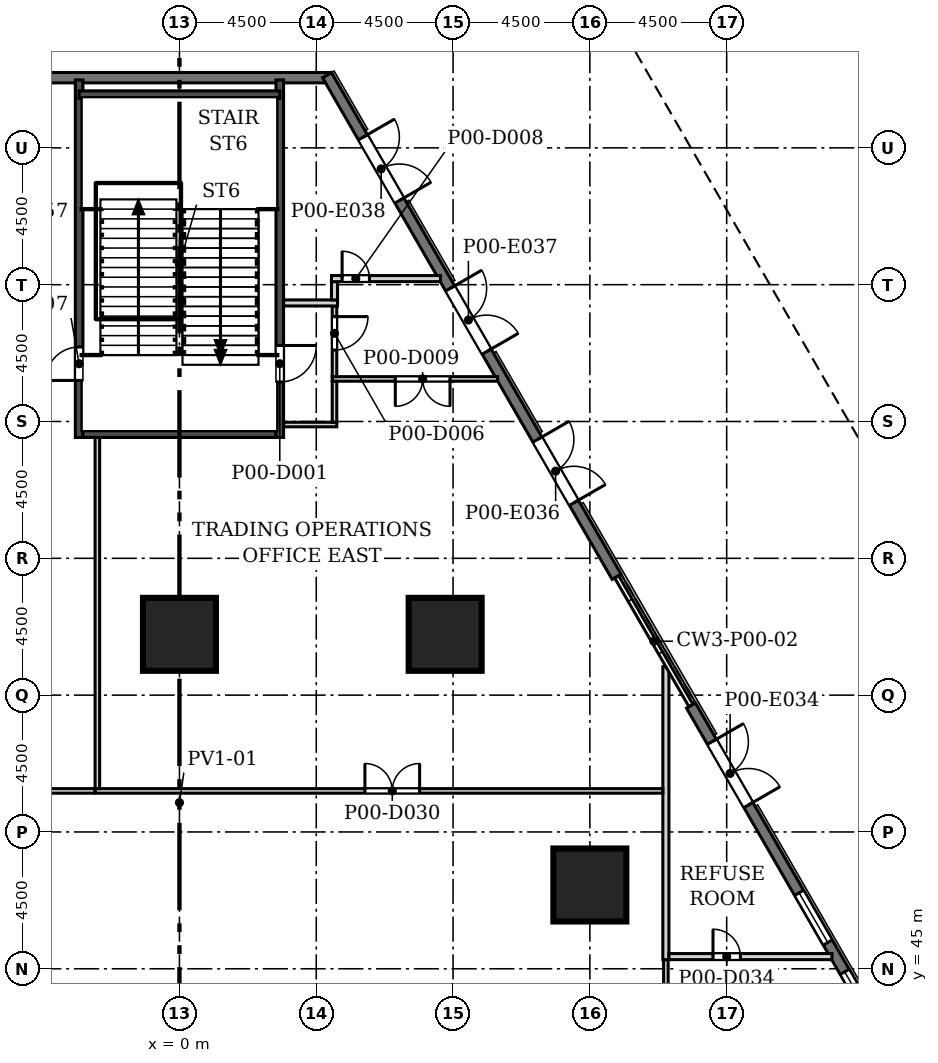
"""IFC4 building model, lengths in metres.
Left out: names, types, materials, properties, quantities, classifications, styles, units other than length and angle.
Written with IfcOpenShell. Run it as: python <this file> out.ifc"""

import sys

from ifc_helpers import new_model, si_unit, direction, frame, frame_2d, origin, origin_2d, place, context, subcontext, project, spatial, polyline, rectangle, outline, extrude, element, fill, save


model = new_model("IFC4")
c1 = context("Model", 3, precision=1e-05, world=origin(), true_north=direction((0.0, 1.0)))
c2 = subcontext(c1, "Body", "Model", "MODEL_VIEW")
j1 = project(units=[si_unit("LENGTHUNIT", "METRE"), si_unit("PLANEANGLEUNIT", "RADIAN")], contexts=[c1])
p1 = place(None, origin())
s1 = spatial("IfcSite", under=j1, at=p1, CompositionType="ELEMENT")
p2 = place(p1, origin())
s2 = spatial("IfcBuilding", under=s1, at=p2, CompositionType="ELEMENT")
p3 = place(p2, origin())
s3 = spatial("IfcBuildingStorey", under=s2, at=p3, CompositionType="ELEMENT", Elevation=0.0)
for number, where, z_axis, x_axis in (
    (1, (8.74, 56.0, 0.0), (0.0, 0.0, 1.0), (1.0, 0.0, 0.0)),
    (2, (0.0, 56.0, 0.0), (0.0, 0.0, 1.0), (1.0, 0.0, 0.0)),
    (3, (13.5, 47.756, 0.0), (0.0, 0.0, 1.0), (1.0, 0.0, 0.0)),
):
    element("IfcColumn", number, at=place(p3, frame(where, z_axis=z_axis, x_axis=x_axis)), inside=s3, PredefinedType="COLUMN", context=c2, shape_type="SweptSolid", body=[
        extrude(rectangle(XDim=2.4, YDim=2.4, at=origin_2d()), origin(), (0.0, 0.0, 1.0), 8.0),
    ])
p4 = place(p3, frame((33.882, 24.114, 0.0), z_axis=(0.0, 0.0, 1.0), x_axis=(-0.500002868947, 0.866023747391, 0.0)))
e4 = element("IfcWall", 4, at=p4, inside=s3, PredefinedType="SOLIDWALL", context=c2, shape_type="SweptSolid", body=[
    extrude(rectangle(XDim=34.115, YDim=0.34, at=frame_2d((17.058, 0.0))), origin(), (0.0, 0.0, 1.0), 7.7),
])
p5 = place(p4, frame((1.115, 0.0, 0.9)))
e5 = element("IfcOpeningElement", 5, at=p5, cuts=e4, PredefinedType="OPENING", context=c2, shape_type="SweptSolid", body=[
    extrude(rectangle(XDim=1.885, YDim=3.5, at=frame_2d((0.942, 1.75))), frame((0.0, 0.18, 0.0), z_axis=(0.0, -1.0, 0.0), x_axis=(1.0, 0.0, 0.0)), (0.0, 0.0, 1.0), 0.36),
])
p6 = place(p4, frame((4.115, 0.0, 0.9)))
e6 = element("IfcOpeningElement", 6, at=p6, cuts=e4, PredefinedType="OPENING", context=c2, shape_type="SweptSolid", body=[
    extrude(rectangle(XDim=1.885, YDim=3.5, at=frame_2d((0.942, 1.75))), frame((0.0, 0.18, 0.0), z_axis=(0.0, -1.0, 0.0), x_axis=(1.0, 0.0, 0.0)), (0.0, 0.0, 1.0), 0.36),
])
p7 = place(p4, frame((22.115, 0.0, 0.9)))
e7 = element("IfcOpeningElement", 7, at=p7, cuts=e4, PredefinedType="OPENING", context=c2, shape_type="SweptSolid", body=[
    extrude(rectangle(XDim=1.885, YDim=3.5, at=frame_2d((0.942, 1.75))), frame((0.0, 0.18, 0.0), z_axis=(0.0, -1.0, 0.0), x_axis=(1.0, 0.0, 0.0)), (0.0, 0.0, 1.0), 0.36),
])
p8 = place(p4, frame((25.115, 0.0, 0.9)))
e8 = element("IfcOpeningElement", 8, at=p8, cuts=e4, PredefinedType="OPENING", context=c2, shape_type="SweptSolid", body=[
    extrude(rectangle(XDim=1.885, YDim=3.5, at=frame_2d((0.942, 1.75))), frame((0.0, 0.18, 0.0), z_axis=(0.0, -1.0, 0.0), x_axis=(1.0, 0.0, 0.0)), (0.0, 0.0, 1.0), 0.36),
])
p9 = place(p4, frame((7.378, 0.0, 0.0)))
e9 = element("IfcOpeningElement", 9, at=p9, cuts=e4, PredefinedType="OPENING", context=c2, shape_type="SweptSolid", body=[
    extrude(rectangle(XDim=2.4, YDim=2.7, at=frame_2d((1.2, 1.35))), frame((0.0, 0.18, 0.0), z_axis=(0.0, -1.0, 0.0), x_axis=(1.0, 0.0, 0.0)), (0.0, 0.0, 1.0), 0.36),
])
p10 = place(p4, frame((18.857, 0.0, 0.0)))
e10 = element("IfcOpeningElement", 10, at=p10, cuts=e4, PredefinedType="OPENING", context=c2, shape_type="SweptSolid", body=[
    extrude(rectangle(XDim=2.4, YDim=2.7, at=frame_2d((1.2, 1.35))), frame((0.0, 0.18, 0.0), z_axis=(0.0, -1.0, 0.0), x_axis=(1.0, 0.0, 0.0)), (0.0, 0.0, 1.0), 0.36),
])
p11 = place(p4, frame((30.336, 0.0, 0.0)))
e11 = element("IfcOpeningElement", 11, at=p11, cuts=e4, PredefinedType="OPENING", context=c2, shape_type="SweptSolid", body=[
    extrude(rectangle(XDim=2.4, YDim=2.7, at=frame_2d((1.2, 1.35))), frame((0.0, 0.18, 0.0), z_axis=(0.0, -1.0, 0.0), x_axis=(1.0, 0.0, 0.0)), (0.0, 0.0, 1.0), 0.36),
])
p12 = place(p4, frame((12.215, 0.0, 0.0)))
e12 = element("IfcOpeningElement", 12, at=p12, cuts=e4, PredefinedType="OPENING", context=c2, shape_type="SweptSolid", body=[
    extrude(rectangle(XDim=4.885, YDim=4.5, at=frame_2d((2.442, 2.25))), frame((0.0, 0.18, 0.0), z_axis=(0.0, -1.0, 0.0), x_axis=(1.0, 0.0, 0.0)), (0.0, 0.0, 1.0), 0.36),
])
p13 = place(p3, frame((14.382, 57.889, 0.0), z_axis=(0.0, 0.0, 1.0), x_axis=(-0.499999683919, 0.866025586274, 0.0)))
e13 = element("IfcWall", 13, at=p13, inside=s3, PredefinedType="SOLIDWALL", context=c2, shape_type="SweptSolid", body=[
    extrude(rectangle(XDim=19.058, YDim=0.34, at=frame_2d((9.529, 0.0))), origin(), (0.0, 0.0, 1.0), 7.7),
])
p14 = place(p13, frame((2.815, 0.0, 0.0)))
e14 = element("IfcOpeningElement", 14, at=p14, cuts=e13, PredefinedType="OPENING", context=c2, shape_type="SweptSolid", body=[
    extrude(rectangle(XDim=2.4, YDim=2.7, at=frame_2d((1.2, 1.35))), frame((0.0, 0.18, 0.0), z_axis=(0.0, -1.0, 0.0), x_axis=(1.0, 0.0, 0.0)), (0.0, 0.0, 1.0), 0.36),
])
p15 = place(p13, frame((8.555, 0.0, 0.0)))
e15 = element("IfcOpeningElement", 15, at=p15, cuts=e13, PredefinedType="OPENING", context=c2, shape_type="SweptSolid", body=[
    extrude(rectangle(XDim=2.4, YDim=2.7, at=frame_2d((1.2, 1.35))), frame((0.0, 0.18, 0.0), z_axis=(0.0, -1.0, 0.0), x_axis=(1.0, 0.0, 0.0)), (0.0, 0.0, 1.0), 0.36),
])
p16 = place(p13, frame((14.294, 0.0, 0.0)))
e16 = element("IfcOpeningElement", 16, at=p16, cuts=e13, PredefinedType="OPENING", context=c2, shape_type="SweptSolid", body=[
    extrude(rectangle(XDim=2.4, YDim=2.7, at=frame_2d((1.2, 1.35))), frame((0.0, 0.18, 0.0), z_axis=(0.0, -1.0, 0.0), x_axis=(1.0, 0.0, 0.0)), (0.0, 0.0, 1.0), 0.36),
])
p17 = place(p3, origin())
e17 = element("IfcWall", 17, at=p17, inside=s3, PredefinedType="SOLIDWALL", context=c2, shape_type="SweptSolid", body=[
    extrude(outline(polyline([(5.001, 74.478), (4.706, 74.308), (4.805, 74.138), (-4.805, 74.138), (-4.706, 74.308), (-5.001, 74.478), (-5.001, 74.479), (5.001, 74.479), (5.001, 74.478)])), origin(), (0.0, 0.0, 1.0), 7.7),
])
p18 = place(p3, frame((16.0, 38.575, 0.0), z_axis=(0.0, 0.0, 1.0), x_axis=(0.0, 1.0, 0.0)))
e18 = element("IfcWall", 18, at=p18, inside=s3, PredefinedType="PARTITIONING", context=c2, shape_type="SweptSolid", body=[
    extrude(rectangle(XDim=6.725, YDim=0.15, at=frame_2d((3.363, 0.0))), origin(), (0.0, 0.0, 1.0), 7.7),
])
p19 = place(p3, frame((16.0, 45.3, 0.0), z_axis=(0.0, 0.0, 1.0), x_axis=(0.0, 1.0, 0.0)))
e19 = element("IfcWall", 19, at=p19, inside=s3, PredefinedType="PARTITIONING", context=c2, shape_type="SweptSolid", body=[
    extrude(rectangle(XDim=9.635, YDim=0.2, at=frame_2d((4.818, 0.0))), origin(), (0.0, 0.0, 1.0), 7.7),
])
p20 = place(p3, frame((21.461, 45.4, 0.0), z_axis=(0.0, 0.0, 1.0), x_axis=(-1.0, 0.0, 0.0)))
e20 = element("IfcWall", 20, at=p20, inside=s3, PredefinedType="PARTITIONING", context=c2, shape_type="SweptSolid", body=[
    extrude(rectangle(XDim=5.361, YDim=0.2, at=frame_2d((2.681, 0.0))), origin(), (0.0, 0.0, 1.0), 7.7),
])
p21 = place(p20, frame((3.011, 0.0, 0.0)))
e21 = element("IfcOpeningElement", 21, at=p21, cuts=e20, PredefinedType="OPENING", context=c2, shape_type="SweptSolid", body=[
    extrude(rectangle(XDim=0.9, YDim=2.1, at=frame_2d((0.45, 1.05))), frame((0.0, 0.11, 0.0), z_axis=(0.0, -1.0, 0.0), x_axis=(1.0, 0.0, 0.0)), (0.0, 0.0, 1.0), 0.22),
])
p22 = place(p3, frame((-16.075, 50.85, 0.0), z_axis=(0.0, 0.0, 1.0), x_axis=(1.0, 0.0, 0.0)))
e22 = element("IfcWall", 22, at=p22, inside=s3, PredefinedType="PARTITIONING", context=c2, shape_type="SweptSolid", body=[
    extrude(rectangle(XDim=13.3, YDim=0.15, at=frame_2d((6.65, 0.0))), origin(), (0.0, 0.0, 1.0), 7.7),
])
p23 = place(p22, frame((7.175, 0.0, 0.0)))
e23 = element("IfcOpeningElement", 23, at=p23, cuts=e22, PredefinedType="OPENING", context=c2, shape_type="SweptSolid", body=[
    extrude(rectangle(XDim=1.8, YDim=2.1, at=frame_2d((0.9, 1.05))), frame((0.0, 0.085, 0.0), z_axis=(0.0, -1.0, 0.0), x_axis=(1.0, 0.0, 0.0)), (0.0, 0.0, 1.0), 0.17),
])
p24 = place(p3, frame((-2.775, 50.85, 0.0), z_axis=(0.0, 0.0, 1.0), x_axis=(1.0, 0.0, 0.0)))
e24 = element("IfcWall", 24, at=p24, inside=s3, PredefinedType="PARTITIONING", context=c2, shape_type="SweptSolid", body=[
    extrude(rectangle(XDim=18.675, YDim=0.15, at=frame_2d((9.337, 0.0))), origin(), (0.0, 0.0, 1.0), 7.7),
])
p25 = place(p24, frame((8.875, 0.0, 0.0)))
e25 = element("IfcOpeningElement", 25, at=p25, cuts=e24, PredefinedType="OPENING", context=c2, shape_type="SweptSolid", body=[
    extrude(rectangle(XDim=1.8, YDim=2.1, at=frame_2d((0.9, 1.05))), frame((0.0, 0.085, 0.0), z_axis=(0.0, -1.0, 0.0), x_axis=(1.0, 0.0, 0.0)), (0.0, 0.0, 1.0), 0.17),
])
p26 = place(p3, frame((-3.3, 62.475, 0.0), z_axis=(0.0, 0.0, 1.0), x_axis=(0.0, 1.0, 0.0)))
e26 = element("IfcWall", 26, at=p26, inside=s3, PredefinedType="SOLIDWALL", context=c2, shape_type="SweptSolid", body=[
    extrude(rectangle(XDim=11.758, YDim=0.25, at=frame_2d((5.879, 0.0))), origin(), (0.0, 0.0, 1.0), 7.7),
])
p27 = place(p26, frame((1.875, 0.0, 0.0)))
e27 = element("IfcOpeningElement", 27, at=p27, cuts=e26, PredefinedType="OPENING", context=c2, shape_type="SweptSolid", body=[
    extrude(rectangle(XDim=1.1, YDim=2.1, at=frame_2d((0.55, 1.05))), frame((0.0, 0.135, 0.0), z_axis=(0.0, -1.0, 0.0), x_axis=(1.0, 0.0, 0.0)), (0.0, 0.0, 1.0), 0.27),
])
p28 = place(p3, frame((-2.7, 62.475, 0.0), z_axis=(0.0, 0.0, 1.0), x_axis=(0.0, -1.0, 0.0)))
e28 = element("IfcWall", 28, at=p28, inside=s3, PredefinedType="PARTITIONING", context=c2, shape_type="SweptSolid", body=[
    extrude(rectangle(XDim=11.55, YDim=0.15, at=frame_2d((5.775, 0.0))), origin(), (0.0, 0.0, 1.0), 7.7),
])
p29 = place(p3, frame((3.175, 62.6, 0.0), z_axis=(0.0, 0.0, 1.0), x_axis=(-1.0, 0.0, 0.0)))
e29 = element("IfcWall", 29, at=p29, inside=s3, PredefinedType="SOLIDWALL", context=c2, shape_type="SweptSolid", body=[
    extrude(rectangle(XDim=6.35, YDim=0.25, at=frame_2d((3.175, 0.0))), origin(), (0.0, 0.0, 1.0), 7.7),
])
p30 = place(p3, frame((5.175, 62.9, 0.0), z_axis=(0.0, 0.0, 1.0), x_axis=(-1.0, 0.0, 0.0)))
e30 = element("IfcWall", 30, at=p30, inside=s3, PredefinedType="PARTITIONING", context=c2, shape_type="SweptSolid", body=[
    extrude(rectangle(XDim=1.75, YDim=0.15, at=frame_2d((0.875, 0.0))), origin(), (0.0, 0.0, 1.0), 7.7),
])
p31 = place(p3, frame((5.1, 64.325, 0.0), z_axis=(0.0, 0.0, 1.0), x_axis=(0.0, -1.0, 0.0)))
e31 = element("IfcWall", 31, at=p31, inside=s3, PredefinedType="PARTITIONING", context=c2, shape_type="SweptSolid", body=[
    extrude(rectangle(XDim=1.35, YDim=0.15, at=frame_2d((0.675, 0.0))), origin(), (0.0, 0.0, 1.0), 7.7),
])
p32 = place(p3, frame((10.466, 64.4, 0.0), z_axis=(0.0, 0.0, 1.0), x_axis=(-1.0, 0.0, 0.0)))
e32 = element("IfcWall", 32, at=p32, inside=s3, PredefinedType="PARTITIONING", context=c2, shape_type="SweptSolid", body=[
    extrude(rectangle(XDim=5.441, YDim=0.15, at=frame_2d((2.721, 0.0))), origin(), (0.0, 0.0, 1.0), 7.7),
])
p33 = place(p32, frame((1.566, 0.0, 0.0)))
e33 = element("IfcOpeningElement", 33, at=p33, cuts=e32, PredefinedType="OPENING", context=c2, shape_type="SweptSolid", body=[
    extrude(rectangle(XDim=1.8, YDim=2.1, at=frame_2d((0.9, 1.05))), frame((0.0, 0.085, 0.0), z_axis=(0.0, -1.0, 0.0), x_axis=(1.0, 0.0, 0.0)), (0.0, 0.0, 1.0), 0.17),
])
p34 = place(p3, frame((5.1, 66.8, 0.0), z_axis=(0.0, 0.0, 1.0), x_axis=(0.0, -1.0, 0.0)))
e34 = element("IfcWall", 34, at=p34, inside=s3, PredefinedType="PARTITIONING", context=c2, shape_type="SweptSolid", body=[
    extrude(rectangle(XDim=2.325, YDim=0.15, at=frame_2d((1.163, 0.0))), origin(), (0.0, 0.0, 1.0), 7.7),
])
p35 = place(p34, frame((0.35, 0.0, 0.0)))
e35 = element("IfcOpeningElement", 35, at=p35, cuts=e34, PredefinedType="OPENING", context=c2, shape_type="SweptSolid", body=[
    extrude(rectangle(XDim=1.1, YDim=2.1, at=frame_2d((0.55, 1.05))), frame((0.0, 0.085, 0.0), z_axis=(0.0, -1.0, 0.0), x_axis=(1.0, 0.0, 0.0)), (0.0, 0.0, 1.0), 0.17),
])
p36 = place(p3, frame((3.425, 66.9, 0.0), z_axis=(0.0, 0.0, 1.0), x_axis=(1.0, 0.0, 0.0)))
e36 = element("IfcWall", 36, at=p36, inside=s3, PredefinedType="PARTITIONING", context=c2, shape_type="SweptSolid", body=[
    extrude(rectangle(XDim=1.775, YDim=0.2, at=frame_2d((0.887, 0.0))), origin(), (0.0, 0.0, 1.0), 7.7),
])
p37 = place(p3, frame((5.1, 67.0, 0.0), z_axis=(0.0, 0.0, 1.0), x_axis=(0.0, 1.0, 0.0)))
e37 = element("IfcWall", 37, at=p37, inside=s3, PredefinedType="PARTITIONING", context=c2, shape_type="SweptSolid", body=[
    extrude(rectangle(XDim=0.6, YDim=0.2, at=frame_2d((0.3, 0.0))), origin(), (0.0, 0.0, 1.0), 7.7),
])
p38 = place(p3, frame((5.0, 67.7, 0.0), z_axis=(0.0, 0.0, 1.0), x_axis=(1.0, 0.0, 0.0)))
e38 = element("IfcWall", 38, at=p38, inside=s3, PredefinedType="PARTITIONING", context=c2, shape_type="SweptSolid", body=[
    extrude(rectangle(XDim=3.586, YDim=0.2, at=frame_2d((1.793, 0.0))), origin(), (0.0, 0.0, 1.0), 7.7),
])
p39 = place(p38, frame((0.35, 0.0, 0.0)))
e39 = element("IfcOpeningElement", 39, at=p39, cuts=e38, PredefinedType="OPENING", context=c2, shape_type="SweptSolid", body=[
    extrude(rectangle(XDim=0.9, YDim=2.1, at=frame_2d((0.45, 1.05))), frame((0.0, 0.11, 0.0), z_axis=(0.0, -1.0, 0.0), x_axis=(1.0, 0.0, 0.0)), (0.0, 0.0, 1.0), 0.22),
])
p40 = place(p3, frame((3.3, 74.233, 0.0), z_axis=(0.0, 0.0, 1.0), x_axis=(0.0, -1.0, 0.0)))
e40 = element("IfcWall", 40, at=p40, inside=s3, PredefinedType="SOLIDWALL", context=c2, shape_type="SweptSolid", body=[
    extrude(rectangle(XDim=11.758, YDim=0.25, at=frame_2d((5.879, 0.0))), origin(), (0.0, 0.0, 1.0), 7.7),
])
p41 = place(p40, frame((8.733, 0.0, 0.0)))
e41 = element("IfcOpeningElement", 41, at=p41, cuts=e40, PredefinedType="OPENING", context=c2, shape_type="SweptSolid", body=[
    extrude(rectangle(XDim=1.2, YDim=2.1, at=frame_2d((0.6, 1.05))), frame((0.0, 0.135, 0.0), z_axis=(0.0, -1.0, 0.0), x_axis=(1.0, 0.0, 0.0)), (0.0, 0.0, 1.0), 0.27),
])
p42 = place(p3, frame((-3.3, 73.75, 0.0), z_axis=(0.0, 0.0, 1.0), x_axis=(1.0, 0.0, 0.0)))
e42 = element("IfcWall", 42, at=p42, inside=s3, PredefinedType="SOLIDWALL", context=c2, shape_type="SweptSolid", body=[
    extrude(rectangle(XDim=6.6, YDim=0.25, at=frame_2d((3.3, 0.0))), origin(), (0.0, 0.0, 1.0), 7.7),
])
p43 = place(p7, origin())
e43 = element("IfcWindow", 43, at=p43, inside=s3, PartitioningType="SINGLE_PANEL", PredefinedType="WINDOW", context=c2, shape_type="SweptSolid", body=[
    extrude(rectangle(XDim=1.885, YDim=3.5, at=frame_2d((0.942, 1.75))), frame((0.0, 0.11, 0.0), z_axis=(0.0, -1.0, 0.0), x_axis=(1.0, 0.0, 0.0)), (0.0, 0.0, 1.0), 0.06),
])
fill(e7, e43)
p44 = place(p8, origin())
e44 = element("IfcWindow", 44, at=p44, inside=s3, PartitioningType="SINGLE_PANEL", PredefinedType="WINDOW", context=c2, shape_type="SweptSolid", body=[
    extrude(rectangle(XDim=1.885, YDim=3.5, at=frame_2d((0.942, 1.75))), frame((0.0, 0.11, 0.0), z_axis=(0.0, -1.0, 0.0), x_axis=(1.0, 0.0, 0.0)), (0.0, 0.0, 1.0), 0.06),
])
fill(e8, e44)
p45 = place(p11, frame((2.4, 0.0, 0.0), z_axis=(0.0, 0.0, 1.0), x_axis=(-1.0, 0.0, 0.0)))
e45 = element("IfcDoor", 45, at=p45, inside=s3, OperationType="DOUBLE_DOOR_SINGLE_SWING", PredefinedType="DOOR", context=c2, shape_type="SweptSolid", body=[
    extrude(rectangle(XDim=2.4, YDim=2.7, at=frame_2d((1.2, 1.35))), frame((0.0, 0.025, 0.0), z_axis=(0.0, -1.0, 0.0), x_axis=(1.0, 0.0, 0.0)), (0.0, 0.0, 1.0), 0.05),
])
fill(e11, e45)
p46 = place(p14, frame((2.4, 0.0, 0.0), z_axis=(0.0, 0.0, 1.0), x_axis=(-1.0, 0.0, 0.0)))
e46 = element("IfcDoor", 46, at=p46, inside=s3, OperationType="DOUBLE_DOOR_SINGLE_SWING", PredefinedType="DOOR", context=c2, shape_type="SweptSolid", body=[
    extrude(rectangle(XDim=2.4, YDim=2.7, at=frame_2d((1.2, 1.35))), frame((0.0, 0.025, 0.0), z_axis=(0.0, -1.0, 0.0), x_axis=(1.0, 0.0, 0.0)), (0.0, 0.0, 1.0), 0.05),
])
fill(e14, e46)
p47 = place(p15, frame((2.4, 0.0, 0.0), z_axis=(0.0, 0.0, 1.0), x_axis=(-1.0, 0.0, 0.0)))
e47 = element("IfcDoor", 47, at=p47, inside=s3, OperationType="DOUBLE_DOOR_SINGLE_SWING", PredefinedType="DOOR", context=c2, shape_type="SweptSolid", body=[
    extrude(rectangle(XDim=2.4, YDim=2.7, at=frame_2d((1.2, 1.35))), frame((0.0, 0.025, 0.0), z_axis=(0.0, -1.0, 0.0), x_axis=(1.0, 0.0, 0.0)), (0.0, 0.0, 1.0), 0.05),
])
fill(e15, e47)
p48 = place(p16, frame((2.4, 0.0, 0.0), z_axis=(0.0, 0.0, 1.0), x_axis=(-1.0, 0.0, 0.0)))
e48 = element("IfcDoor", 48, at=p48, inside=s3, OperationType="DOUBLE_DOOR_SINGLE_SWING", PredefinedType="DOOR", context=c2, shape_type="SweptSolid", body=[
    extrude(rectangle(XDim=2.4, YDim=2.7, at=frame_2d((1.2, 1.35))), frame((0.0, 0.025, 0.0), z_axis=(0.0, -1.0, 0.0), x_axis=(1.0, 0.0, 0.0)), (0.0, 0.0, 1.0), 0.05),
])
fill(e16, e48)
p49 = place(p41, origin())
e49 = element("IfcDoor", 49, at=p49, inside=s3, OperationType="SINGLE_SWING_LEFT", PredefinedType="DOOR", context=c2, shape_type="SweptSolid", body=[
    extrude(rectangle(XDim=1.2, YDim=2.1, at=frame_2d((0.6, 1.05))), frame((0.0, 0.025, 0.0), z_axis=(0.0, -1.0, 0.0), x_axis=(1.0, 0.0, 0.0)), (0.0, 0.0, 1.0), 0.05),
])
fill(e41, e49)
p50 = place(p35, origin())
e50 = element("IfcDoor", 50, at=p50, inside=s3, OperationType="SINGLE_SWING_LEFT", PredefinedType="DOOR", context=c2, shape_type="SweptSolid", body=[
    extrude(rectangle(XDim=1.1, YDim=2.1, at=frame_2d((0.55, 1.05))), frame((0.0, 0.025, 0.0), z_axis=(0.0, -1.0, 0.0), x_axis=(1.0, 0.0, 0.0)), (0.0, 0.0, 1.0), 0.05),
])
fill(e35, e50)
p51 = place(p27, origin())
e51 = element("IfcDoor", 51, at=p51, inside=s3, OperationType="SINGLE_SWING_LEFT", PredefinedType="DOOR", context=c2, shape_type="SweptSolid", body=[
    extrude(rectangle(XDim=1.1, YDim=2.1, at=frame_2d((0.55, 1.05))), frame((0.0, 0.025, 0.0), z_axis=(0.0, -1.0, 0.0), x_axis=(1.0, 0.0, 0.0)), (0.0, 0.0, 1.0), 0.05),
])
fill(e27, e51)
p52 = place(p39, origin())
e52 = element("IfcDoor", 52, at=p52, inside=s3, OperationType="SINGLE_SWING_LEFT", PredefinedType="DOOR", context=c2, shape_type="SweptSolid", body=[
    extrude(rectangle(XDim=0.9, YDim=2.1, at=frame_2d((0.45, 1.05))), frame((0.0, 0.025, 0.0), z_axis=(0.0, -1.0, 0.0), x_axis=(1.0, 0.0, 0.0)), (0.0, 0.0, 1.0), 0.05),
])
fill(e39, e52)
p53 = place(p33, origin())
e53 = element("IfcDoor", 53, at=p53, inside=s3, OperationType="DOUBLE_DOOR_SINGLE_SWING", PredefinedType="DOOR", context=c2, shape_type="SweptSolid", body=[
    extrude(rectangle(XDim=1.8, YDim=2.1, at=frame_2d((0.9, 1.05))), frame((0.0, 0.025, 0.0), z_axis=(0.0, -1.0, 0.0), x_axis=(1.0, 0.0, 0.0)), (0.0, 0.0, 1.0), 0.05),
])
fill(e33, e53)
p54 = place(p25, origin())
e54 = element("IfcDoor", 54, at=p54, inside=s3, OperationType="DOUBLE_DOOR_SINGLE_SWING", PredefinedType="DOOR", context=c2, shape_type="SweptSolid", body=[
    extrude(rectangle(XDim=1.8, YDim=2.1, at=frame_2d((0.9, 1.05))), frame((0.0, 0.025, 0.0), z_axis=(0.0, -1.0, 0.0), x_axis=(1.0, 0.0, 0.0)), (0.0, 0.0, 1.0), 0.05),
])
fill(e25, e54)
p55 = place(p21, frame((0.9, 0.0, 0.0), z_axis=(0.0, 0.0, 1.0), x_axis=(-1.0, 0.0, 0.0)))
e55 = element("IfcDoor", 55, at=p55, inside=s3, OperationType="SINGLE_SWING_LEFT", PredefinedType="DOOR", context=c2, shape_type="SweptSolid", body=[
    extrude(rectangle(XDim=0.9, YDim=2.1, at=frame_2d((0.45, 1.05))), frame((0.0, 0.025, 0.0), z_axis=(0.0, -1.0, 0.0), x_axis=(1.0, 0.0, 0.0)), (0.0, 0.0, 1.0), 0.05),
])
fill(e21, e55)
save(model, sys.argv[1])
